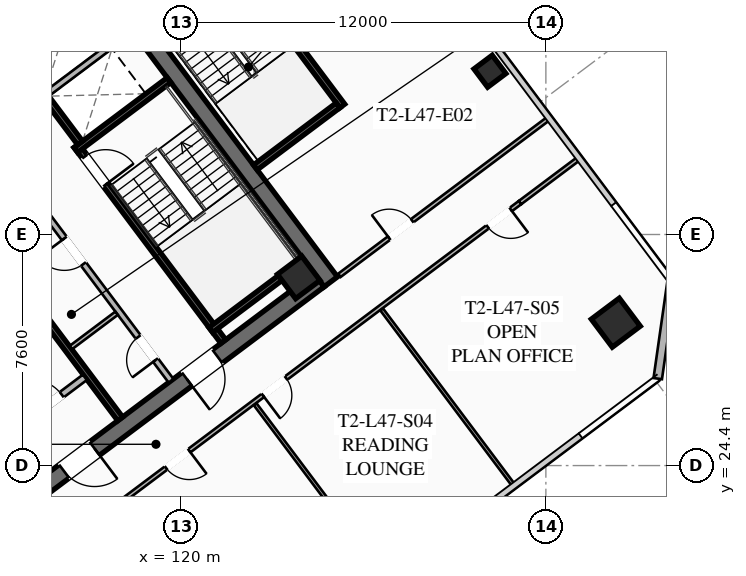
"""IFC4 building model, lengths in metres.
Left out: names, types, materials, properties, quantities, classifications, styles, units other than length and angle.
Written with IfcOpenShell. Run it as: python <this file> out.ifc"""

import sys

from ifc_helpers import new_model, si_unit, direction, frame, frame_2d, origin, origin_2d, place, context, subcontext, project, spatial, rectangle, hollow_rectangle, extrude, element, fill, save


model = new_model("IFC4")
c1 = context("Model", 3, precision=1e-05, world=origin(), true_north=direction((0.0, 1.0)))
c2 = subcontext(c1, "Body", "Model", "MODEL_VIEW")
j1 = project(units=[si_unit("LENGTHUNIT", "METRE"), si_unit("PLANEANGLEUNIT", "RADIAN")], contexts=[c1])
p1 = place(None, origin())
s1 = spatial("IfcSite", under=j1, at=p1, CompositionType="ELEMENT")
p2 = place(p1, origin())
s2 = spatial("IfcBuilding", under=s1, at=p2, CompositionType="ELEMENT")
p3 = place(p2, frame((0.0, 0.0, 174.75)))
s3 = spatial("IfcBuildingStorey", under=s2, at=p3, CompositionType="ELEMENT", Elevation=174.75)
p4 = place(p3, frame((115.564, 42.923, 0.0), z_axis=(0.0, 0.0, 1.0), x_axis=(0.600005007985, -0.799996243986, 0.0)))
e1 = element("IfcWall", 1, at=p4, inside=s3, PredefinedType="SHEAR", context=c2, shape_type="SweptSolid", body=[
    extrude(rectangle(XDim=15.6, YDim=0.55, at=frame_2d((7.8, 0.0))), origin(), (0.0, 0.0, 1.0), 3.55),
])
p5 = place(p3, frame((124.539, 30.498, 0.0), z_axis=(0.0, 0.0, 1.0), x_axis=(-0.799998054672, -0.600002593761, 0.0)))
e2 = element("IfcWall", 2, at=p5, inside=s3, PredefinedType="SHEAR", context=c2, shape_type="SweptSolid", body=[
    extrude(rectangle(XDim=15.06, YDim=0.55, at=frame_2d((7.53, 0.0))), origin(), (0.0, 0.0, 1.0), 3.55),
])
p6 = place(p5, frame((9.23, 0.0, 0.0)))
e3 = element("IfcOpeningElement", 3, at=p6, cuts=e2, PredefinedType="OPENING", context=c2, shape_type="SweptSolid", body=[
    extrude(rectangle(XDim=1.25, YDim=2.25, at=frame_2d((0.625, 1.125))), frame((0.0, 0.285, 0.0), z_axis=(0.0, -1.0, 0.0), x_axis=(1.0, 0.0, 0.0)), (0.0, 0.0, 1.0), 0.57),
])
p7 = place(p5, frame((4.18, 0.0, 0.0)))
e4 = element("IfcOpeningElement", 4, at=p7, cuts=e2, PredefinedType="OPENING", context=c2, shape_type="SweptSolid", body=[
    extrude(rectangle(XDim=1.25, YDim=2.25, at=frame_2d((0.625, 1.125))), frame((0.0, 0.285, 0.0), z_axis=(0.0, -1.0, 0.0), x_axis=(1.0, 0.0, 0.0)), (0.0, 0.0, 1.0), 0.57),
])
p8 = place(p3, frame((123.87, 30.59, 0.0), z_axis=(0.0, 0.0, 1.0), x_axis=(0.799999996291, 0.600000004945, 0.0)))
e5 = element("IfcColumn", 5, at=p8, inside=s3, PredefinedType="COLUMN", context=c2, shape_type="SweptSolid", body=[
    extrude(hollow_rectangle(XDim=1.0, YDim=1.0, WallThickness=0.04, at=origin_2d()), origin(), (0.0, 0.0, 1.0), 3.37),
])
p9 = place(p3, frame((134.3, 29.1, 0.0), z_axis=(0.0, 0.0, 1.0), x_axis=(0.799999996291, 0.600000004945, 0.0)))
e6 = element("IfcColumn", 6, at=p9, inside=s3, PredefinedType="COLUMN", context=c2, shape_type="SweptSolid", body=[
    extrude(hollow_rectangle(XDim=1.15, YDim=1.15, WallThickness=0.045, at=origin_2d()), origin(), (0.0, 0.0, 1.0), 3.37),
])
p10 = place(p3, frame((130.16, 37.37, 0.0), z_axis=(0.0, 0.0, 1.0), x_axis=(0.799999996291, 0.600000004945, 0.0)))
e7 = element("IfcColumn", 7, at=p10, inside=s3, PredefinedType="COLUMN", context=c2, shape_type="SweptSolid", body=[
    extrude(hollow_rectangle(XDim=0.75, YDim=0.75, WallThickness=0.032, at=origin_2d()), origin(), (0.0, 0.0, 1.0), 3.37),
])
p11 = place(p3, frame((136.14, 30.48, 0.0), z_axis=(0.0, 0.0, 1.0), x_axis=(-0.141410847992, -0.989950994782, 0.0)))
e8 = element("IfcWall", 8, at=p11, inside=s3, PredefinedType="SOLIDWALL", context=c2, shape_type="SweptSolid", body=[
    extrude(rectangle(XDim=3.253, YDim=0.28, at=frame_2d((1.626, 0.0))), origin(), (0.0, 0.0, 1.0), 3.37),
])
p12 = place(p3, frame((116.56, 34.92, 0.0), z_axis=(0.0, 0.0, 1.0), x_axis=(0.59999029481, -0.8000072788, 0.0)))
e9 = element("IfcWall", 9, at=p12, inside=s3, PredefinedType="SHEAR", context=c2, shape_type="SweptSolid", body=[
    extrude(rectangle(XDim=8.05, YDim=0.2, at=frame_2d((4.025, 0.0))), origin(), (0.0, 0.0, 1.0), 3.37),
])
p13 = place(p12, frame((0.45, 0.0, 0.0)))
e10 = element("IfcOpeningElement", 10, at=p13, cuts=e9, PredefinedType="OPENING", context=c2, shape_type="SweptSolid", body=[
    extrude(rectangle(XDim=1.15, YDim=2.2, at=frame_2d((0.575, 1.1))), frame((0.0, 0.11, 0.0), z_axis=(0.0, -1.0, 0.0), x_axis=(1.0, 0.0, 0.0)), (0.0, 0.0, 1.0), 0.22),
])
for number, where, z_axis, x_axis in (
    (11, (116.54, 34.78, 0.0), (0.0, 0.0, 1.0), (0.8, 0.6, 0.0)),
    (12, (120.98, 28.86, 0.0), (0.0, 0.0, 1.0), (0.8, 0.6, 0.0)),
):
    element("IfcWall", number, at=place(p3, frame(where, z_axis=z_axis, x_axis=x_axis)), inside=s3, PredefinedType="SHEAR", context=c2, shape_type="SweptSolid", body=[
        extrude(rectangle(XDim=3.83, YDim=0.2, at=frame_2d((1.915, 0.0))), origin(), (0.0, 0.0, 1.0), 3.37),
    ])
p14 = place(p3, frame((117.998, 25.936, 0.0), z_axis=(0.0, 0.0, 1.0), x_axis=(-0.600002693989, 0.799997979501, 0.0)))
e13 = element("IfcWall", 13, at=p14, inside=s3, PredefinedType="SHEAR", context=c2, shape_type="SweptSolid", body=[
    extrude(rectangle(XDim=14.5, YDim=0.2, at=frame_2d((7.25, 0.0))), origin(), (0.0, 0.0, 1.0), 3.37),
])
p15 = place(p3, frame((114.316, 25.412, 0.0), z_axis=(0.0, 0.0, 1.0), x_axis=(0.800018601094, 0.59997519774, 0.0)))
e14 = element("IfcWall", 14, at=p15, inside=s3, PredefinedType="SOLIDWALL", context=c2, shape_type="SweptSolid", body=[
    extrude(rectangle(XDim=3.15, YDim=0.22, at=frame_2d((1.575, 0.0))), origin(), (0.0, 0.0, 1.0), 2.723),
])
p16 = place(p15, frame((0.95, 0.0, 0.0)))
e15 = element("IfcOpeningElement", 15, at=p16, cuts=e14, PredefinedType="OPENING", context=c2, shape_type="SweptSolid", body=[
    extrude(rectangle(XDim=1.25, YDim=2.25, at=frame_2d((0.625, 1.125))), frame((0.0, 0.12, 0.0), z_axis=(0.0, -1.0, 0.0), x_axis=(1.0, 0.0, 0.0)), (0.0, 0.0, 1.0), 0.24),
])
p17 = place(p3, frame((112.81, 40.17, 0.0), z_axis=(0.0, 0.0, 1.0), x_axis=(0.599993943644, -0.800004542231, 0.0)))
e16 = element("IfcWall", 16, at=p17, inside=s3, PredefinedType="SHEAR", context=c2, shape_type="SweptSolid", body=[
    extrude(rectangle(XDim=6.45, YDim=0.2, at=frame_2d((3.225, 0.0))), origin(), (0.0, 0.0, 1.0), 3.37),
])
p18 = place(p3, frame((115.59, 36.63, 0.0), z_axis=(0.0, 0.0, 1.0), x_axis=(0.799974743577, 0.600033673754, 0.0)))
e17 = element("IfcWall", 17, at=p18, inside=s3, PredefinedType="SOLIDWALL", context=c2, shape_type="SweptSolid", body=[
    extrude(rectangle(XDim=3.48, YDim=0.2, at=frame_2d((1.74, 0.0))), origin(), (0.0, 0.0, 1.0), 3.37),
])
p19 = place(p3, frame((119.67, 27.19, 0.0), z_axis=(0.0, 0.0, 1.0), x_axis=(-0.599988677396, 0.800008491828, 0.0)))
e18 = element("IfcWall", 18, at=p19, inside=s3, PredefinedType="SOLIDWALL", context=c2, shape_type="SweptSolid", body=[
    extrude(rectangle(XDim=6.9, YDim=0.2, at=frame_2d((3.45, 0.0))), origin(), (0.0, 0.0, 1.0), 2.723),
])
p20 = place(p19, frame((0.85, 0.0, 0.0)))
e19 = element("IfcOpeningElement", 19, at=p20, cuts=e18, PredefinedType="OPENING", context=c2, shape_type="SweptSolid", body=[
    extrude(rectangle(XDim=0.95, YDim=2.05, at=frame_2d((0.475, 1.025))), frame((0.0, 0.11, 0.0), z_axis=(0.0, -1.0, 0.0), x_axis=(1.0, 0.0, 0.0)), (0.0, 0.0, 1.0), 0.22),
])
p21 = place(p19, frame((4.8, 0.0, 0.0)))
e20 = element("IfcOpeningElement", 20, at=p21, cuts=e18, PredefinedType="OPENING", context=c2, shape_type="SweptSolid", body=[
    extrude(rectangle(XDim=1.05, YDim=2.2, at=frame_2d((0.525, 1.1))), frame((0.0, 0.11, 0.0), z_axis=(0.0, -1.0, 0.0), x_axis=(1.0, 0.0, 0.0)), (0.0, 0.0, 1.0), 0.22),
])
p22 = place(p3, frame((116.376, 28.282, 0.0), z_axis=(0.0, 0.0, 1.0), x_axis=(0.8, 0.6, 0.0)))
e21 = element("IfcWall", 21, at=p22, inside=s3, PredefinedType="PARTITIONING", context=c2, shape_type="SweptSolid", body=[
    extrude(rectangle(XDim=1.88, YDim=0.135, at=frame_2d((0.94, 0.0))), origin(), (0.0, 0.0, 1.0), 2.723),
])
p23 = place(p3, frame((125.304, 36.228, 0.0), z_axis=(0.0, 0.0, 1.0), x_axis=(-0.59998851072, 0.800008616831, 0.0)))
e22 = element("IfcWall", 22, at=p23, inside=s3, PredefinedType="SHEAR", context=c2, shape_type="SweptSolid", body=[
    extrude(rectangle(XDim=6.8, YDim=0.2, at=frame_2d((3.4, 0.0))), origin(), (0.0, 0.0, 1.0), 3.37),
])
p24 = place(p3, frame((122.444, 34.208, 0.0), z_axis=(0.0, 0.0, 1.0), x_axis=(0.79999138319, 0.600011488909, 0.0)))
e23 = element("IfcWall", 23, at=p24, inside=s3, PredefinedType="SHEAR", context=c2, shape_type="SweptSolid", body=[
    extrude(rectangle(XDim=3.4, YDim=0.2, at=frame_2d((1.7, 0.0))), origin(), (0.0, 0.0, 1.0), 3.37),
])
p25 = place(p3, frame((95.548, 32.686, 0.0), z_axis=(0.0, 0.0, 1.0), x_axis=(0.8, 0.6, 0.0)))
e24 = element("IfcWall", 24, at=p25, inside=s3, PredefinedType="PARTITIONING", context=c2, shape_type="SweptSolid", body=[
    extrude(rectangle(XDim=28.7, YDim=0.135, at=frame_2d((14.35, 0.0))), origin(), (0.0, 0.0, 1.0), 2.723),
])
p26 = place(p25, frame((0.3, 0.0, 0.0)))
e25 = element("IfcOpeningElement", 25, at=p26, cuts=e24, PredefinedType="OPENING", context=c2, shape_type="SweptSolid", body=[
    extrude(rectangle(XDim=0.95, YDim=2.05, at=frame_2d((0.475, 1.025))), frame((0.0, 0.077, 0.0), z_axis=(0.0, -1.0, 0.0), x_axis=(1.0, 0.0, 0.0)), (0.0, 0.0, 1.0), 0.155),
])
p27 = place(p25, frame((27.45, 0.0, 0.0)))
e26 = element("IfcOpeningElement", 26, at=p27, cuts=e24, PredefinedType="OPENING", context=c2, shape_type="SweptSolid", body=[
    extrude(rectangle(XDim=0.95, YDim=2.05, at=frame_2d((0.475, 1.025))), frame((0.0, 0.077, 0.0), z_axis=(0.0, -1.0, 0.0), x_axis=(1.0, 0.0, 0.0)), (0.0, 0.0, 1.0), 0.155),
])
p28 = place(p3, frame((131.15, 33.05, 0.0), z_axis=(0.0, 0.0, 1.0), x_axis=(-0.8, -0.6, 0.0)))
e27 = element("IfcWall", 27, at=p28, inside=s3, PredefinedType="PARTITIONING", context=c2, shape_type="SweptSolid", body=[
    extrude(rectangle(XDim=28.7, YDim=0.135, at=frame_2d((14.35, 0.0))), origin(), (0.0, 0.0, 1.0), 2.723),
])
p29 = place(p28, frame((27.37, 0.0, 0.0)))
e28 = element("IfcOpeningElement", 28, at=p29, cuts=e27, PredefinedType="OPENING", context=c2, shape_type="SweptSolid", body=[
    extrude(rectangle(XDim=0.95, YDim=2.05, at=frame_2d((0.475, 1.025))), frame((0.0, 0.077, 0.0), z_axis=(0.0, -1.0, 0.0), x_axis=(1.0, 0.0, 0.0)), (0.0, 0.0, 1.0), 0.155),
])
p30 = place(p28, frame((17.851, 0.0, 0.0)))
e29 = element("IfcOpeningElement", 29, at=p30, cuts=e27, PredefinedType="OPENING", context=c2, shape_type="SweptSolid", body=[
    extrude(rectangle(XDim=0.95, YDim=2.05, at=frame_2d((0.475, 1.025))), frame((0.0, 0.077, 0.0), z_axis=(0.0, -1.0, 0.0), x_axis=(1.0, 0.0, 0.0)), (0.0, 0.0, 1.0), 0.155),
])
p31 = place(p28, frame((13.601, 0.0, 0.0)))
e30 = element("IfcOpeningElement", 30, at=p31, cuts=e27, PredefinedType="OPENING", context=c2, shape_type="SweptSolid", body=[
    extrude(rectangle(XDim=0.95, YDim=2.05, at=frame_2d((0.475, 1.025))), frame((0.0, 0.077, 0.0), z_axis=(0.0, -1.0, 0.0), x_axis=(1.0, 0.0, 0.0)), (0.0, 0.0, 1.0), 0.155),
])
p32 = place(p28, frame((9.62, 0.0, 0.0)))
e31 = element("IfcOpeningElement", 31, at=p32, cuts=e27, PredefinedType="OPENING", context=c2, shape_type="SweptSolid", body=[
    extrude(rectangle(XDim=0.95, YDim=2.05, at=frame_2d((0.475, 1.025))), frame((0.0, 0.077, 0.0), z_axis=(0.0, -1.0, 0.0), x_axis=(1.0, 0.0, 0.0)), (0.0, 0.0, 1.0), 0.155),
])
p33 = place(p28, frame((0.38, 0.0, 0.0)))
e32 = element("IfcOpeningElement", 32, at=p33, cuts=e27, PredefinedType="OPENING", context=c2, shape_type="SweptSolid", body=[
    extrude(rectangle(XDim=0.95, YDim=2.05, at=frame_2d((0.475, 1.025))), frame((0.0, 0.077, 0.0), z_axis=(0.0, -1.0, 0.0), x_axis=(1.0, 0.0, 0.0)), (0.0, 0.0, 1.0), 0.155),
])
p34 = place(p3, frame((131.15, 33.05, 0.0), z_axis=(0.0, 0.0, 1.0), x_axis=(0.800012055778, 0.599983925293, 0.0)))
e33 = element("IfcWall", 33, at=p34, inside=s3, PredefinedType="PARTITIONING", context=c2, shape_type="SweptSolid", body=[
    extrude(rectangle(XDim=2.43, YDim=0.135, at=frame_2d((1.215, 0.0))), origin(), (0.0, 0.0, 1.0), 2.723),
])
for number, where, z_axis, x_axis in (
    (34, (126.788, 20.616, 0.0), (0.0, 0.0, 1.0), (-0.6, 0.8, 0.0)),
    (35, (130.948, 23.736, 0.0), (0.0, 0.0, 1.0), (-0.6, 0.8, 0.0)),
):
    element("IfcWall", number, at=place(p3, frame(where, z_axis=z_axis, x_axis=x_axis)), inside=s3, PredefinedType="PARTITIONING", context=c2, shape_type="SweptSolid", body=[
        extrude(rectangle(XDim=7.25, YDim=0.11, at=frame_2d((3.625, 0.0))), origin(), (0.0, 0.0, 1.0), 2.723),
    ])
p35 = place(p3, frame((125.208, 30.656, 0.0), z_axis=(0.0, 0.0, 1.0), x_axis=(0.800006797429, 0.599990936654, 0.0)))
e36 = element("IfcWall", 36, at=p35, inside=s3, PredefinedType="PARTITIONING", context=c2, shape_type="SweptSolid", body=[
    extrude(rectangle(XDim=8.62, YDim=0.135, at=frame_2d((4.31, 0.0))), origin(), (0.0, 0.0, 1.0), 2.723),
])
p36 = place(p35, frame((2.045, 0.0, 0.0)))
e37 = element("IfcOpeningElement", 37, at=p36, cuts=e36, PredefinedType="OPENING", context=c2, shape_type="SweptSolid", body=[
    extrude(rectangle(XDim=0.95, YDim=2.05, at=frame_2d((0.475, 1.025))), frame((0.0, 0.077, 0.0), z_axis=(0.0, -1.0, 0.0), x_axis=(1.0, 0.0, 0.0)), (0.0, 0.0, 1.0), 0.155),
])
p37 = place(p6, origin())
e38 = element("IfcDoor", 38, at=p37, inside=s3, OperationType="SINGLE_SWING_LEFT", PredefinedType="DOOR", context=c2, shape_type="SweptSolid", body=[
    extrude(rectangle(XDim=1.25, YDim=2.25, at=frame_2d((0.625, 1.125))), frame((0.0, 0.025, 0.0), z_axis=(0.0, -1.0, 0.0), x_axis=(1.0, 0.0, 0.0)), (0.0, 0.0, 1.0), 0.05),
])
fill(e3, e38)
p38 = place(p7, origin())
e39 = element("IfcDoor", 39, at=p38, inside=s3, OperationType="SINGLE_SWING_RIGHT", PredefinedType="DOOR", context=c2, shape_type="SweptSolid", body=[
    extrude(rectangle(XDim=1.25, YDim=2.25, at=frame_2d((0.625, 1.125))), frame((0.0, 0.025, 0.0), z_axis=(0.0, -1.0, 0.0), x_axis=(1.0, 0.0, 0.0)), (0.0, 0.0, 1.0), 0.05),
])
fill(e4, e39)
p39 = place(p13, origin())
e40 = element("IfcDoor", 40, at=p39, inside=s3, OperationType="SINGLE_SWING_RIGHT", PredefinedType="DOOR", context=c2, shape_type="SweptSolid", body=[
    extrude(rectangle(XDim=1.15, YDim=2.2, at=frame_2d((0.575, 1.1))), frame((0.0, 0.025, 0.0), z_axis=(0.0, -1.0, 0.0), x_axis=(1.0, 0.0, 0.0)), (0.0, 0.0, 1.0), 0.05),
])
fill(e10, e40)
p40 = place(p16, origin())
e41 = element("IfcDoor", 41, at=p40, inside=s3, OperationType="SINGLE_SWING_LEFT", PredefinedType="DOOR", context=c2, shape_type="SweptSolid", body=[
    extrude(rectangle(XDim=1.25, YDim=2.25, at=frame_2d((0.625, 1.125))), frame((0.0, 0.025, 0.0), z_axis=(0.0, -1.0, 0.0), x_axis=(1.0, 0.0, 0.0)), (0.0, 0.0, 1.0), 0.05),
])
fill(e15, e41)
p41 = place(p20, origin())
e42 = element("IfcDoor", 42, at=p41, inside=s3, OperationType="SINGLE_SWING_LEFT", PredefinedType="DOOR", context=c2, shape_type="SweptSolid", body=[
    extrude(rectangle(XDim=0.95, YDim=2.05, at=frame_2d((0.475, 1.025))), frame((0.0, 0.025, 0.0), z_axis=(0.0, -1.0, 0.0), x_axis=(1.0, 0.0, 0.0)), (0.0, 0.0, 1.0), 0.05),
])
fill(e19, e42)
p42 = place(p21, origin())
e43 = element("IfcDoor", 43, at=p42, inside=s3, OperationType="SINGLE_SWING_RIGHT", PredefinedType="DOOR", context=c2, shape_type="SweptSolid", body=[
    extrude(rectangle(XDim=1.05, YDim=2.2, at=frame_2d((0.525, 1.1))), frame((0.0, 0.025, 0.0), z_axis=(0.0, -1.0, 0.0), x_axis=(1.0, 0.0, 0.0)), (0.0, 0.0, 1.0), 0.05),
])
fill(e20, e43)
p43 = place(p31, origin())
e44 = element("IfcDoor", 44, at=p43, inside=s3, OperationType="SINGLE_SWING_LEFT", PredefinedType="DOOR", context=c2, shape_type="SweptSolid", body=[
    extrude(rectangle(XDim=0.95, YDim=2.05, at=frame_2d((0.475, 1.025))), frame((0.0, 0.025, 0.0), z_axis=(0.0, -1.0, 0.0), x_axis=(1.0, 0.0, 0.0)), (0.0, 0.0, 1.0), 0.05),
])
fill(e30, e44)
p44 = place(p32, origin())
e45 = element("IfcDoor", 45, at=p44, inside=s3, OperationType="SINGLE_SWING_RIGHT", PredefinedType="DOOR", context=c2, shape_type="SweptSolid", body=[
    extrude(rectangle(XDim=0.95, YDim=2.05, at=frame_2d((0.475, 1.025))), frame((0.0, 0.025, 0.0), z_axis=(0.0, -1.0, 0.0), x_axis=(1.0, 0.0, 0.0)), (0.0, 0.0, 1.0), 0.05),
])
fill(e31, e45)
p45 = place(p33, origin())
e46 = element("IfcDoor", 46, at=p45, inside=s3, OperationType="SINGLE_SWING_LEFT", PredefinedType="DOOR", context=c2, shape_type="SweptSolid", body=[
    extrude(rectangle(XDim=0.95, YDim=2.05, at=frame_2d((0.475, 1.025))), frame((0.0, 0.025, 0.0), z_axis=(0.0, -1.0, 0.0), x_axis=(1.0, 0.0, 0.0)), (0.0, 0.0, 1.0), 0.05),
])
fill(e32, e46)
p46 = place(p36, origin())
e47 = element("IfcDoor", 47, at=p46, inside=s3, OperationType="SINGLE_SWING_LEFT", PredefinedType="DOOR", context=c2, shape_type="SweptSolid", body=[
    extrude(rectangle(XDim=0.95, YDim=2.05, at=frame_2d((0.475, 1.025))), frame((0.0, 0.025, 0.0), z_axis=(0.0, -1.0, 0.0), x_axis=(1.0, 0.0, 0.0)), (0.0, 0.0, 1.0), 0.05),
])
fill(e37, e47)
save(model, sys.argv[1])
